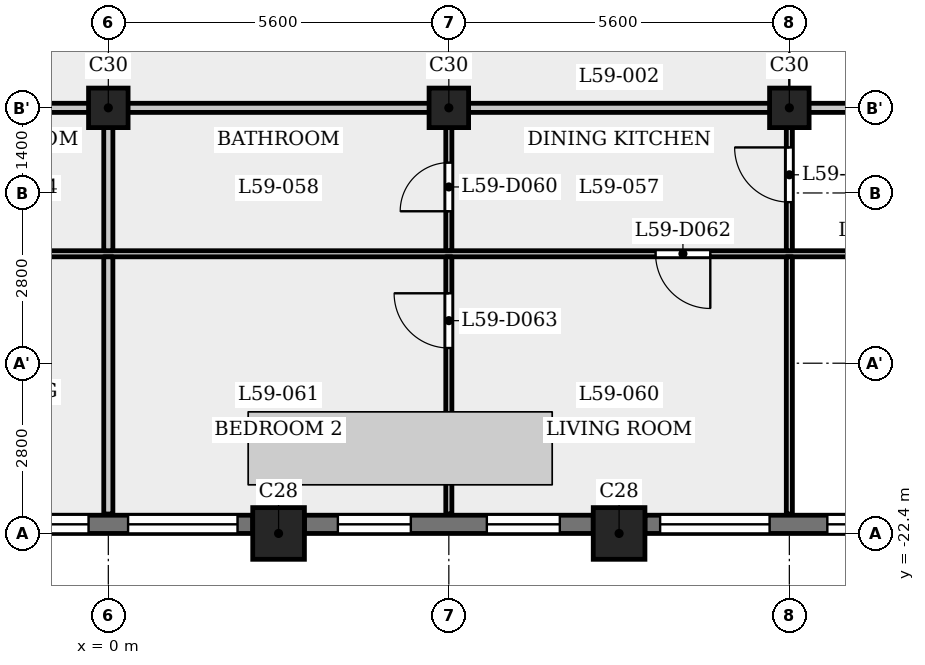
"""IFC4 building model, lengths in metres.
Left out: names, types, materials, properties, quantities, classifications, styles, units other than length and angle.
Written with IfcOpenShell. Run it as: python <this file> out.ifc"""

import sys

from ifc_helpers import new_model, si_unit, direction, frame, frame_2d, origin, origin_2d, place, context, subcontext, project, spatial, rectangle, extrude, element, fill, save


model = new_model("IFC4")
c1 = context("Model", 3, precision=1e-05, world=origin(), true_north=direction((0.0, 1.0)))
c2 = subcontext(c1, "Body", "Model", "MODEL_VIEW")
j1 = project(units=[si_unit("LENGTHUNIT", "METRE"), si_unit("PLANEANGLEUNIT", "RADIAN")], contexts=[c1])
p1 = place(None, origin())
s1 = spatial("IfcSite", under=j1, at=p1, CompositionType="ELEMENT")
p2 = place(p1, origin())
s2 = spatial("IfcBuilding", under=s1, at=p2, CompositionType="ELEMENT")
p3 = place(p2, frame((0.0, 0.0, 227.4)))
s3 = spatial("IfcBuildingStorey", under=s2, at=p3, CompositionType="ELEMENT", Elevation=227.4)
for number, where, z_axis, x_axis in (
    (1, (2.8, -22.4, 0.0), (0.0, 0.0, 1.0), (1.0, 0.0, 0.0)),
    (2, (8.4, -22.4, 0.0), (0.0, 0.0, 1.0), (1.0, 0.0, 0.0)),
):
    element("IfcColumn", number, at=place(p3, frame(where, z_axis=z_axis, x_axis=x_axis)), inside=s3, PredefinedType="COLUMN", context=c2, shape_type="SweptSolid", body=[
        extrude(rectangle(XDim=0.85, YDim=0.85, at=origin_2d()), origin(), (0.0, 0.0, 1.0), 3.5),
    ])
for number, where, z_axis, x_axis in (
    (3, (0.0, -15.4, 0.0), (0.0, 0.0, 1.0), (1.0, 0.0, 0.0)),
    (4, (5.6, -15.4, 0.0), (0.0, 0.0, 1.0), (1.0, 0.0, 0.0)),
    (5, (11.2, -15.4, 0.0), (0.0, 0.0, 1.0), (1.0, 0.0, 0.0)),
):
    element("IfcColumn", number, at=place(p3, frame(where, z_axis=z_axis, x_axis=x_axis)), inside=s3, PredefinedType="COLUMN", context=c2, shape_type="SweptSolid", body=[
        extrude(rectangle(XDim=0.65, YDim=0.65, at=origin_2d()), origin(), (0.0, 0.0, 1.0), 3.5),
    ])
p4 = place(p3, frame((-2.375, -22.25, 0.0), z_axis=(0.0, 0.0, 1.0), x_axis=(1.0, 0.0, 0.0)))
e6 = element("IfcWall", 6, at=p4, inside=s3, PredefinedType="SOLIDWALL", context=c2, shape_type="SweptSolid", body=[
    extrude(rectangle(XDim=4.75, YDim=0.3, at=frame_2d((2.375, 0.0))), origin(), (0.0, 0.0, 1.0), 2.45),
])
p5 = place(p4, frame((0.25, 0.0, 0.9)))
e7 = element("IfcOpeningElement", 7, at=p5, cuts=e6, PredefinedType="OPENING", context=c2, shape_type="SweptSolid", body=[
    extrude(rectangle(XDim=1.8, YDim=1.25, at=frame_2d((0.9, 0.625))), frame((0.0, 0.16, 0.0), z_axis=(0.0, -1.0, 0.0), x_axis=(1.0, 0.0, 0.0)), (0.0, 0.0, 1.0), 0.32),
])
p6 = place(p4, frame((2.7, 0.0, 0.9)))
e8 = element("IfcOpeningElement", 8, at=p6, cuts=e6, PredefinedType="OPENING", context=c2, shape_type="SweptSolid", body=[
    extrude(rectangle(XDim=1.8, YDim=1.25, at=frame_2d((0.9, 0.625))), frame((0.0, 0.16, 0.0), z_axis=(0.0, -1.0, 0.0), x_axis=(1.0, 0.0, 0.0)), (0.0, 0.0, 1.0), 0.32),
])
p7 = place(p3, frame((3.225, -22.25, 0.0), z_axis=(0.0, 0.0, 1.0), x_axis=(1.0, 0.0, 0.0)))
e9 = element("IfcWall", 9, at=p7, inside=s3, PredefinedType="SOLIDWALL", context=c2, shape_type="SweptSolid", body=[
    extrude(rectangle(XDim=4.75, YDim=0.3, at=frame_2d((2.375, 0.0))), origin(), (0.0, 0.0, 1.0), 2.45),
])
p8 = place(p7, frame((0.55, 0.0, 0.6)))
e10 = element("IfcOpeningElement", 10, at=p8, cuts=e9, PredefinedType="OPENING", context=c2, shape_type="SweptSolid", body=[
    extrude(rectangle(XDim=1.2, YDim=1.55, at=frame_2d((0.6, 0.775))), frame((0.0, 0.16, 0.0), z_axis=(0.0, -1.0, 0.0), x_axis=(1.0, 0.0, 0.0)), (0.0, 0.0, 1.0), 0.32),
])
p9 = place(p7, frame((3.0, 0.0, 0.6)))
e11 = element("IfcOpeningElement", 11, at=p9, cuts=e9, PredefinedType="OPENING", context=c2, shape_type="SweptSolid", body=[
    extrude(rectangle(XDim=1.2, YDim=1.55, at=frame_2d((0.6, 0.775))), frame((0.0, 0.16, 0.0), z_axis=(0.0, -1.0, 0.0), x_axis=(1.0, 0.0, 0.0)), (0.0, 0.0, 1.0), 0.32),
])
p10 = place(p3, frame((8.825, -22.25, 0.0), z_axis=(0.0, 0.0, 1.0), x_axis=(1.0, 0.0, 0.0)))
e12 = element("IfcWall", 12, at=p10, inside=s3, PredefinedType="SOLIDWALL", context=c2, shape_type="SweptSolid", body=[
    extrude(rectangle(XDim=4.75, YDim=0.3, at=frame_2d((2.375, 0.0))), origin(), (0.0, 0.0, 1.0), 2.45),
])
p11 = place(p10, frame((0.25, 0.0, 0.9)))
e13 = element("IfcOpeningElement", 13, at=p11, cuts=e12, PredefinedType="OPENING", context=c2, shape_type="SweptSolid", body=[
    extrude(rectangle(XDim=1.8, YDim=1.25, at=frame_2d((0.9, 0.625))), frame((0.0, 0.16, 0.0), z_axis=(0.0, -1.0, 0.0), x_axis=(1.0, 0.0, 0.0)), (0.0, 0.0, 1.0), 0.32),
])
p12 = place(p10, frame((3.0, 0.0, 0.6)))
e14 = element("IfcOpeningElement", 14, at=p12, cuts=e12, PredefinedType="OPENING", context=c2, shape_type="SweptSolid", body=[
    extrude(rectangle(XDim=1.2, YDim=1.55, at=frame_2d((0.6, 0.775))), frame((0.0, 0.16, 0.0), z_axis=(0.0, -1.0, 0.0), x_axis=(1.0, 0.0, 0.0)), (0.0, 0.0, 1.0), 0.32),
])
p13 = place(p3, frame((-23.594, -17.8, 0.0), z_axis=(0.0, 0.0, 1.0), x_axis=(1.0, 0.0, 0.0)))
e15 = element("IfcWall", 15, at=p13, inside=s3, PredefinedType="PARTITIONING", context=c2, shape_type="SweptSolid", body=[
    extrude(rectangle(XDim=47.188, YDim=0.1, at=frame_2d((23.594, 0.0))), origin(), (0.0, 0.0, 1.0), 3.15),
])
p14 = place(p13, frame((5.094, 0.0, 0.0)))
e16 = element("IfcOpeningElement", 16, at=p14, cuts=e15, PredefinedType="OPENING", context=c2, shape_type="SweptSolid", body=[
    extrude(rectangle(XDim=0.8, YDim=2.1, at=frame_2d((0.4, 1.05))), frame((0.0, 0.06, 0.0), z_axis=(0.0, -1.0, 0.0), x_axis=(1.0, 0.0, 0.0)), (0.0, 0.0, 1.0), 0.12),
])
p15 = place(p13, frame((1.126, 0.0, 0.0)))
e17 = element("IfcOpeningElement", 17, at=p15, cuts=e15, PredefinedType="OPENING", context=c2, shape_type="SweptSolid", body=[
    extrude(rectangle(XDim=0.9, YDim=2.1, at=frame_2d((0.45, 1.05))), frame((0.0, 0.06, 0.0), z_axis=(0.0, -1.0, 0.0), x_axis=(1.0, 0.0, 0.0)), (0.0, 0.0, 1.0), 0.12),
])
p16 = place(p13, frame((9.944, 0.0, 0.0)))
e18 = element("IfcOpeningElement", 18, at=p16, cuts=e15, PredefinedType="OPENING", context=c2, shape_type="SweptSolid", body=[
    extrude(rectangle(XDim=0.8, YDim=2.1, at=frame_2d((0.4, 1.05))), frame((0.0, 0.06, 0.0), z_axis=(0.0, -1.0, 0.0), x_axis=(1.0, 0.0, 0.0)), (0.0, 0.0, 1.0), 0.12),
])
p17 = place(p13, frame((7.444, 0.0, 0.0)))
e19 = element("IfcOpeningElement", 19, at=p17, cuts=e15, PredefinedType="OPENING", context=c2, shape_type="SweptSolid", body=[
    extrude(rectangle(XDim=0.9, YDim=2.1, at=frame_2d((0.45, 1.05))), frame((0.0, 0.06, 0.0), z_axis=(0.0, -1.0, 0.0), x_axis=(1.0, 0.0, 0.0)), (0.0, 0.0, 1.0), 0.12),
])
p18 = place(p13, frame((16.544, 0.0, 0.0)))
e20 = element("IfcOpeningElement", 20, at=p18, cuts=e15, PredefinedType="OPENING", context=c2, shape_type="SweptSolid", body=[
    extrude(rectangle(XDim=0.8, YDim=2.1, at=frame_2d((0.4, 1.05))), frame((0.0, 0.06, 0.0), z_axis=(0.0, -1.0, 0.0), x_axis=(1.0, 0.0, 0.0)), (0.0, 0.0, 1.0), 0.12),
])
p19 = place(p13, frame((13.294, 0.0, 0.0)))
e21 = element("IfcOpeningElement", 21, at=p19, cuts=e15, PredefinedType="OPENING", context=c2, shape_type="SweptSolid", body=[
    extrude(rectangle(XDim=0.9, YDim=2.1, at=frame_2d((0.45, 1.05))), frame((0.0, 0.06, 0.0), z_axis=(0.0, -1.0, 0.0), x_axis=(1.0, 0.0, 0.0)), (0.0, 0.0, 1.0), 0.12),
])
p20 = place(p13, frame((21.144, 0.0, 0.0)))
e22 = element("IfcOpeningElement", 22, at=p20, cuts=e15, PredefinedType="OPENING", context=c2, shape_type="SweptSolid", body=[
    extrude(rectangle(XDim=0.8, YDim=2.1, at=frame_2d((0.4, 1.05))), frame((0.0, 0.06, 0.0), z_axis=(0.0, -1.0, 0.0), x_axis=(1.0, 0.0, 0.0)), (0.0, 0.0, 1.0), 0.12),
])
p21 = place(p13, frame((18.894, 0.0, 0.0)))
e23 = element("IfcOpeningElement", 23, at=p21, cuts=e15, PredefinedType="OPENING", context=c2, shape_type="SweptSolid", body=[
    extrude(rectangle(XDim=0.9, YDim=2.1, at=frame_2d((0.45, 1.05))), frame((0.0, 0.06, 0.0), z_axis=(0.0, -1.0, 0.0), x_axis=(1.0, 0.0, 0.0)), (0.0, 0.0, 1.0), 0.12),
])
p22 = place(p13, frame((35.944, 0.0, 0.0)))
e24 = element("IfcOpeningElement", 24, at=p22, cuts=e15, PredefinedType="OPENING", context=c2, shape_type="SweptSolid", body=[
    extrude(rectangle(XDim=0.9, YDim=2.1, at=frame_2d((0.45, 1.05))), frame((0.0, 0.06, 0.0), z_axis=(0.0, -1.0, 0.0), x_axis=(1.0, 0.0, 0.0)), (0.0, 0.0, 1.0), 0.12),
])
p23 = place(p13, frame((32.594, 0.0, 0.0)))
e25 = element("IfcOpeningElement", 25, at=p23, cuts=e15, PredefinedType="OPENING", context=c2, shape_type="SweptSolid", body=[
    extrude(rectangle(XDim=0.9, YDim=2.1, at=frame_2d((0.45, 1.05))), frame((0.0, 0.06, 0.0), z_axis=(0.0, -1.0, 0.0), x_axis=(1.0, 0.0, 0.0)), (0.0, 0.0, 1.0), 0.12),
])
p24 = place(p13, frame((40.944, 0.0, 0.0)))
e26 = element("IfcOpeningElement", 26, at=p24, cuts=e15, PredefinedType="OPENING", context=c2, shape_type="SweptSolid", body=[
    extrude(rectangle(XDim=0.8, YDim=2.1, at=frame_2d((0.4, 1.05))), frame((0.0, 0.06, 0.0), z_axis=(0.0, -1.0, 0.0), x_axis=(1.0, 0.0, 0.0)), (0.0, 0.0, 1.0), 0.12),
])
p25 = place(p13, frame((45.444, 0.0, 0.0)))
e27 = element("IfcOpeningElement", 27, at=p25, cuts=e15, PredefinedType="OPENING", context=c2, shape_type="SweptSolid", body=[
    extrude(rectangle(XDim=0.9, YDim=2.1, at=frame_2d((0.45, 1.05))), frame((0.0, 0.06, 0.0), z_axis=(0.0, -1.0, 0.0), x_axis=(1.0, 0.0, 0.0)), (0.0, 0.0, 1.0), 0.12),
])
p26 = place(p3, frame((-24.684, -15.4, 0.0), z_axis=(0.0, 0.0, 1.0), x_axis=(1.0, 0.0, 0.0)))
e28 = element("IfcWall", 28, at=p26, inside=s3, PredefinedType="PARTITIONING", context=c2, shape_type="SweptSolid", body=[
    extrude(rectangle(XDim=49.368, YDim=0.15, at=frame_2d((24.684, 0.0))), origin(), (0.0, 0.0, 1.0), 3.15),
])
p27 = place(p26, frame((1.143, 0.0, 0.0)))
e29 = element("IfcOpeningElement", 29, at=p27, cuts=e28, PredefinedType="OPENING", context=c2, shape_type="SweptSolid", body=[
    extrude(rectangle(XDim=1.0, YDim=2.1, at=frame_2d((0.5, 1.05))), frame((0.0, 0.085, 0.0), z_axis=(0.0, -1.0, 0.0), x_axis=(1.0, 0.0, 0.0)), (0.0, 0.0, 1.0), 0.17),
])
p28 = place(p26, frame((8.534, 0.0, 0.0)))
e30 = element("IfcOpeningElement", 30, at=p28, cuts=e28, PredefinedType="OPENING", context=c2, shape_type="SweptSolid", body=[
    extrude(rectangle(XDim=1.0, YDim=2.1, at=frame_2d((0.5, 1.05))), frame((0.0, 0.085, 0.0), z_axis=(0.0, -1.0, 0.0), x_axis=(1.0, 0.0, 0.0)), (0.0, 0.0, 1.0), 0.17),
])
p29 = place(p26, frame((15.384, 0.0, 0.0)))
e31 = element("IfcOpeningElement", 31, at=p29, cuts=e28, PredefinedType="OPENING", context=c2, shape_type="SweptSolid", body=[
    extrude(rectangle(XDim=1.0, YDim=2.1, at=frame_2d((0.5, 1.05))), frame((0.0, 0.085, 0.0), z_axis=(0.0, -1.0, 0.0), x_axis=(1.0, 0.0, 0.0)), (0.0, 0.0, 1.0), 0.17),
])
p30 = place(p26, frame((19.984, 0.0, 0.0)))
e32 = element("IfcOpeningElement", 32, at=p30, cuts=e28, PredefinedType="OPENING", context=c2, shape_type="SweptSolid", body=[
    extrude(rectangle(XDim=1.0, YDim=2.1, at=frame_2d((0.5, 1.05))), frame((0.0, 0.085, 0.0), z_axis=(0.0, -1.0, 0.0), x_axis=(1.0, 0.0, 0.0)), (0.0, 0.0, 1.0), 0.17),
])
p31 = place(p26, frame((39.784, 0.0, 0.0)))
e33 = element("IfcOpeningElement", 33, at=p31, cuts=e28, PredefinedType="OPENING", context=c2, shape_type="SweptSolid", body=[
    extrude(rectangle(XDim=1.0, YDim=2.1, at=frame_2d((0.5, 1.05))), frame((0.0, 0.085, 0.0), z_axis=(0.0, -1.0, 0.0), x_axis=(1.0, 0.0, 0.0)), (0.0, 0.0, 1.0), 0.17),
])
p32 = place(p26, frame((47.384, 0.0, 0.0)))
e34 = element("IfcOpeningElement", 34, at=p32, cuts=e28, PredefinedType="OPENING", context=c2, shape_type="SweptSolid", body=[
    extrude(rectangle(XDim=1.0, YDim=2.1, at=frame_2d((0.5, 1.05))), frame((0.0, 0.085, 0.0), z_axis=(0.0, -1.0, 0.0), x_axis=(1.0, 0.0, 0.0)), (0.0, 0.0, 1.0), 0.17),
])
p33 = place(p3, frame((0.0, -22.08, 0.0), z_axis=(0.0, 0.0, 1.0), x_axis=(0.0, 1.0, 0.0)))
e35 = element("IfcWall", 35, at=p33, inside=s3, PredefinedType="PARTITIONING", context=c2, shape_type="SweptSolid", body=[
    extrude(rectangle(XDim=4.23, YDim=0.15, at=frame_2d((2.115, 0.0))), origin(), (0.0, 0.0, 1.0), 3.15),
])
p34 = place(p3, frame((0.0, -17.75, 0.0), z_axis=(0.0, 0.0, 1.0), x_axis=(0.0, 1.0, 0.0)))
e36 = element("IfcWall", 36, at=p34, inside=s3, PredefinedType="PARTITIONING", context=c2, shape_type="SweptSolid", body=[
    extrude(rectangle(XDim=2.275, YDim=0.15, at=frame_2d((1.137, 0.0))), origin(), (0.0, 0.0, 1.0), 3.15),
])
p35 = place(p3, frame((5.6, -22.08, 0.0), z_axis=(0.0, 0.0, 1.0), x_axis=(0.0, 1.0, 0.0)))
e37 = element("IfcWall", 37, at=p35, inside=s3, PredefinedType="PARTITIONING", context=c2, shape_type="SweptSolid", body=[
    extrude(rectangle(XDim=4.23, YDim=0.1, at=frame_2d((2.115, 0.0))), origin(), (0.0, 0.0, 1.0), 3.15),
])
p36 = place(p35, frame((2.73, 0.0, 0.0)))
e38 = element("IfcOpeningElement", 38, at=p36, cuts=e37, PredefinedType="OPENING", context=c2, shape_type="SweptSolid", body=[
    extrude(rectangle(XDim=0.9, YDim=2.1, at=frame_2d((0.45, 1.05))), frame((0.0, 0.06, 0.0), z_axis=(0.0, -1.0, 0.0), x_axis=(1.0, 0.0, 0.0)), (0.0, 0.0, 1.0), 0.12),
])
p37 = place(p3, frame((5.6, -17.75, 0.0), z_axis=(0.0, 0.0, 1.0), x_axis=(0.0, 1.0, 0.0)))
e39 = element("IfcWall", 39, at=p37, inside=s3, PredefinedType="PARTITIONING", context=c2, shape_type="SweptSolid", body=[
    extrude(rectangle(XDim=2.275, YDim=0.1, at=frame_2d((1.137, 0.0))), origin(), (0.0, 0.0, 1.0), 3.15),
])
p38 = place(p37, frame((0.649, 0.0, 0.0)))
e40 = element("IfcOpeningElement", 40, at=p38, cuts=e39, PredefinedType="OPENING", context=c2, shape_type="SweptSolid", body=[
    extrude(rectangle(XDim=0.8, YDim=2.1, at=frame_2d((0.4, 1.05))), frame((0.0, 0.06, 0.0), z_axis=(0.0, -1.0, 0.0), x_axis=(1.0, 0.0, 0.0)), (0.0, 0.0, 1.0), 0.12),
])
p39 = place(p3, frame((11.2, -22.08, 0.0), z_axis=(0.0, 0.0, 1.0), x_axis=(0.0, 1.0, 0.0)))
e41 = element("IfcWall", 41, at=p39, inside=s3, PredefinedType="PARTITIONING", context=c2, shape_type="SweptSolid", body=[
    extrude(rectangle(XDim=4.23, YDim=0.1, at=frame_2d((2.115, 0.0))), origin(), (0.0, 0.0, 1.0), 3.15),
])
p40 = place(p3, frame((11.2, -17.75, 0.0), z_axis=(0.0, 0.0, 1.0), x_axis=(0.0, 1.0, 0.0)))
e42 = element("IfcWall", 42, at=p40, inside=s3, PredefinedType="PARTITIONING", context=c2, shape_type="SweptSolid", body=[
    extrude(rectangle(XDim=2.275, YDim=0.1, at=frame_2d((1.137, 0.0))), origin(), (0.0, 0.0, 1.0), 3.15),
])
p41 = place(p40, frame((0.799, 0.0, 0.0)))
e43 = element("IfcOpeningElement", 43, at=p41, cuts=e42, PredefinedType="OPENING", context=c2, shape_type="SweptSolid", body=[
    extrude(rectangle(XDim=0.9, YDim=2.1, at=frame_2d((0.45, 1.05))), frame((0.0, 0.06, 0.0), z_axis=(0.0, -1.0, 0.0), x_axis=(1.0, 0.0, 0.0)), (0.0, 0.0, 1.0), 0.12),
])
p42 = place(p41, origin())
e44 = element("IfcDoor", 44, at=p42, inside=s3, OperationType="SINGLE_SWING_LEFT", PredefinedType="DOOR", context=c2, shape_type="SweptSolid", body=[
    extrude(rectangle(XDim=0.9, YDim=2.1, at=frame_2d((0.45, 1.05))), frame((0.0, 0.025, 0.0), z_axis=(0.0, -1.0, 0.0), x_axis=(1.0, 0.0, 0.0)), (0.0, 0.0, 1.0), 0.05),
])
fill(e43, e44)
p43 = place(p38, origin())
e45 = element("IfcDoor", 45, at=p43, inside=s3, OperationType="SINGLE_SWING_RIGHT", PredefinedType="DOOR", context=c2, shape_type="SweptSolid", body=[
    extrude(rectangle(XDim=0.8, YDim=2.1, at=frame_2d((0.4, 1.05))), frame((0.0, 0.025, 0.0), z_axis=(0.0, -1.0, 0.0), x_axis=(1.0, 0.0, 0.0)), (0.0, 0.0, 1.0), 0.05),
])
fill(e40, e45)
p44 = place(p23, origin())
e46 = element("IfcDoor", 46, at=p44, inside=s3, OperationType="SINGLE_SWING_RIGHT", PredefinedType="DOOR", context=c2, shape_type="SweptSolid", body=[
    extrude(rectangle(XDim=0.9, YDim=2.1, at=frame_2d((0.45, 1.05))), frame((0.0, 0.025, 0.0), z_axis=(0.0, -1.0, 0.0), x_axis=(1.0, 0.0, 0.0)), (0.0, 0.0, 1.0), 0.05),
])
fill(e25, e46)
p45 = place(p36, origin())
e47 = element("IfcDoor", 47, at=p45, inside=s3, OperationType="SINGLE_SWING_LEFT", PredefinedType="DOOR", context=c2, shape_type="SweptSolid", body=[
    extrude(rectangle(XDim=0.9, YDim=2.1, at=frame_2d((0.45, 1.05))), frame((0.0, 0.025, 0.0), z_axis=(0.0, -1.0, 0.0), x_axis=(1.0, 0.0, 0.0)), (0.0, 0.0, 1.0), 0.05),
])
fill(e38, e47)
p46 = place(p5, origin())
e48 = element("IfcWindow", 48, at=p46, inside=s3, PartitioningType="SINGLE_PANEL", PredefinedType="WINDOW", context=c2, shape_type="SweptSolid", body=[
    extrude(rectangle(XDim=1.8, YDim=1.25, at=frame_2d((0.9, 0.625))), frame((0.0, 0.03, 0.0), z_axis=(0.0, -1.0, 0.0), x_axis=(1.0, 0.0, 0.0)), (0.0, 0.0, 1.0), 0.06),
])
fill(e7, e48)
p47 = place(p6, origin())
e49 = element("IfcWindow", 49, at=p47, inside=s3, PartitioningType="SINGLE_PANEL", PredefinedType="WINDOW", context=c2, shape_type="SweptSolid", body=[
    extrude(rectangle(XDim=1.8, YDim=1.25, at=frame_2d((0.9, 0.625))), frame((0.0, 0.03, 0.0), z_axis=(0.0, -1.0, 0.0), x_axis=(1.0, 0.0, 0.0)), (0.0, 0.0, 1.0), 0.06),
])
fill(e8, e49)
p48 = place(p8, origin())
e50 = element("IfcWindow", 50, at=p48, inside=s3, PartitioningType="SINGLE_PANEL", PredefinedType="WINDOW", context=c2, shape_type="SweptSolid", body=[
    extrude(rectangle(XDim=1.2, YDim=1.55, at=frame_2d((0.6, 0.775))), frame((0.0, 0.03, 0.0), z_axis=(0.0, -1.0, 0.0), x_axis=(1.0, 0.0, 0.0)), (0.0, 0.0, 1.0), 0.06),
])
fill(e10, e50)
p49 = place(p9, origin())
e51 = element("IfcWindow", 51, at=p49, inside=s3, PartitioningType="SINGLE_PANEL", PredefinedType="WINDOW", context=c2, shape_type="SweptSolid", body=[
    extrude(rectangle(XDim=1.2, YDim=1.55, at=frame_2d((0.6, 0.775))), frame((0.0, 0.03, 0.0), z_axis=(0.0, -1.0, 0.0), x_axis=(1.0, 0.0, 0.0)), (0.0, 0.0, 1.0), 0.06),
])
fill(e11, e51)
p50 = place(p11, origin())
e52 = element("IfcWindow", 52, at=p50, inside=s3, PartitioningType="SINGLE_PANEL", PredefinedType="WINDOW", context=c2, shape_type="SweptSolid", body=[
    extrude(rectangle(XDim=1.8, YDim=1.25, at=frame_2d((0.9, 0.625))), frame((0.0, 0.03, 0.0), z_axis=(0.0, -1.0, 0.0), x_axis=(1.0, 0.0, 0.0)), (0.0, 0.0, 1.0), 0.06),
])
fill(e13, e52)
p51 = place(p12, origin())
e53 = element("IfcWindow", 53, at=p51, inside=s3, PartitioningType="SINGLE_PANEL", PredefinedType="WINDOW", context=c2, shape_type="SweptSolid", body=[
    extrude(rectangle(XDim=1.2, YDim=1.55, at=frame_2d((0.6, 0.775))), frame((0.0, 0.03, 0.0), z_axis=(0.0, -1.0, 0.0), x_axis=(1.0, 0.0, 0.0)), (0.0, 0.0, 1.0), 0.06),
])
fill(e14, e53)
save(model, sys.argv[1])
